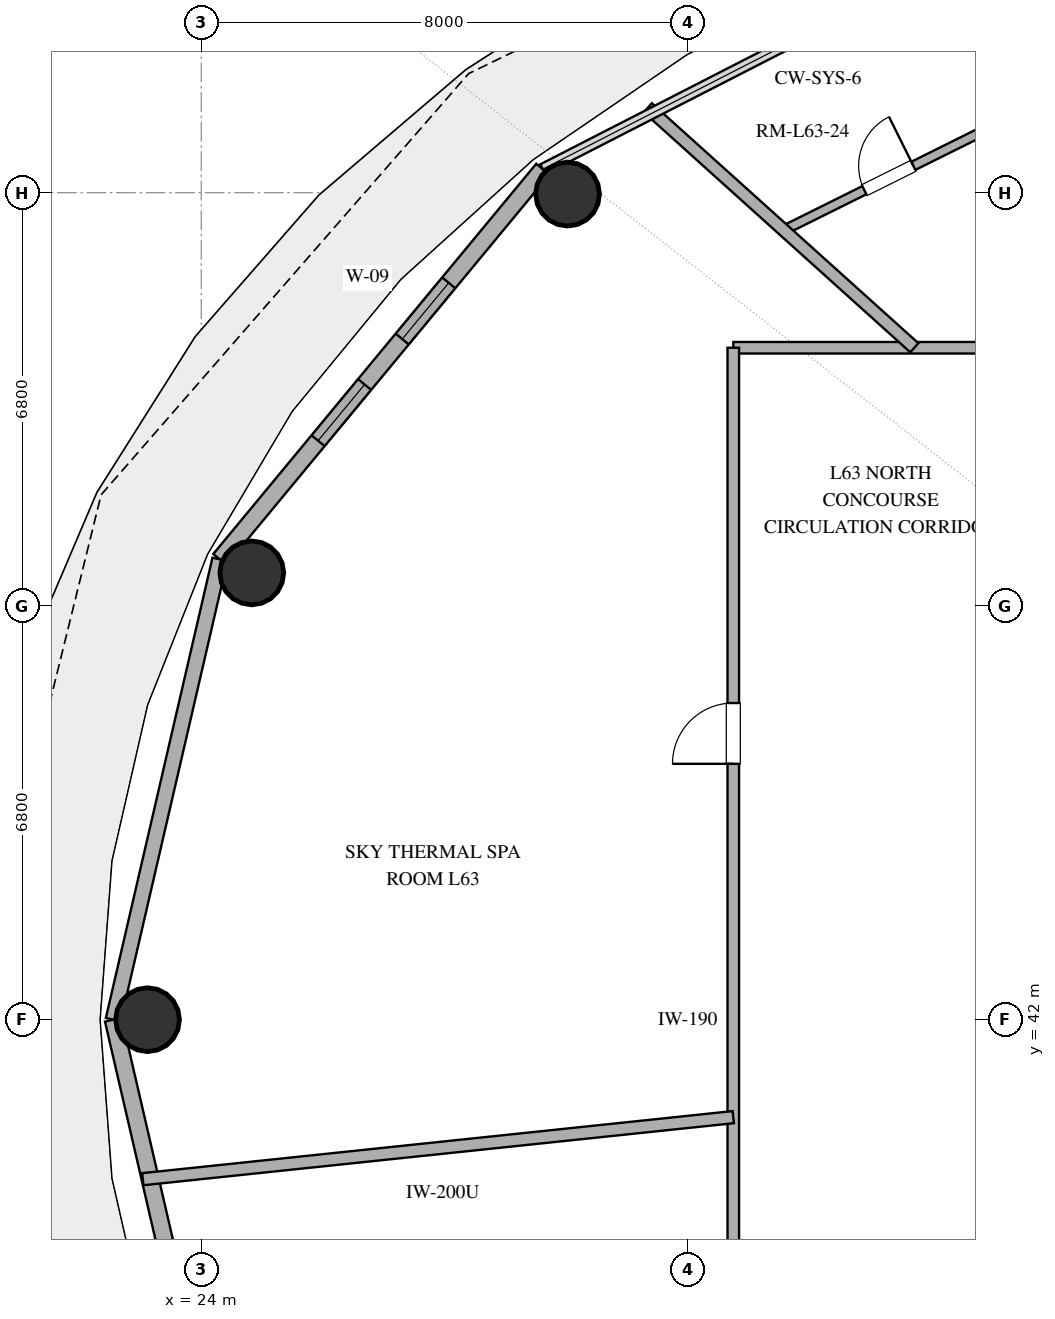
"""IFC4 building model, lengths in metres.
Left out: names, types, materials, properties, quantities, classifications, styles, units other than length and angle.
Written with IfcOpenShell. Run it as: python <this file> out.ifc"""

import sys

from ifc_helpers import new_model, si_unit, direction, frame, frame_2d, origin, origin_2d, place, context, subcontext, project, spatial, rectangle, hollow_circle, extrude, element, fill, save


model = new_model("IFC4")
c1 = context("Model", 3, precision=1e-05, world=origin(), true_north=direction((0.0, 1.0)))
c2 = subcontext(c1, "Body", "Model", "MODEL_VIEW")
j1 = project(units=[si_unit("LENGTHUNIT", "METRE"), si_unit("PLANEANGLEUNIT", "RADIAN")], contexts=[c1])
p1 = place(None, origin())
s1 = spatial("IfcSite", under=j1, at=p1, CompositionType="ELEMENT")
p2 = place(p1, origin())
s2 = spatial("IfcBuilding", under=s1, at=p2, CompositionType="ELEMENT")
p3 = place(p2, frame((0.0, 0.0, 246.0)))
s3 = spatial("IfcBuildingStorey", under=s2, at=p3, CompositionType="ELEMENT", Elevation=246.0)
for number, where, z_axis, x_axis in (
    (1, (30.025, 55.576, 0.0), (0.0, 0.0, 1.0), (1.0, 0.0, 0.0)),
    (2, (24.831, 49.347, 0.0), (0.0, 0.0, 1.0), (1.0, 0.0, 0.0)),
    (3, (23.117, 42.0, 0.0), (0.0, 0.0, 1.0), (1.0, 0.0, 0.0)),
):
    element("IfcColumn", number, at=place(p3, frame(where, z_axis=z_axis, x_axis=x_axis)), inside=s3, PredefinedType="COLUMN", context=c2, shape_type="SweptSolid", body=[
        extrude(hollow_circle(Radius=0.525, WallThickness=0.028, at=origin_2d()), origin(), (0.0, 0.0, 1.0), 3.36),
    ])
p4 = place(p3, frame((29.617, 55.987, 0.0), z_axis=(0.0, 0.0, 1.0), x_axis=(-0.63761509934, -0.770355103243, 0.0)))
e4 = element("IfcWall", 4, at=p4, inside=s3, PredefinedType="SOLIDWALL", context=c2, shape_type="SweptSolid", body=[
    extrude(rectangle(XDim=8.33, YDim=0.28, at=frame_2d((4.165, 0.0))), origin(), (0.0, 0.0, 1.0), 3.36),
])
p5 = place(p4, frame((2.426, 0.0, 0.85)))
e5 = element("IfcOpeningElement", 5, at=p5, cuts=e4, PredefinedType="OPENING", context=c2, shape_type="SweptSolid", body=[
    extrude(rectangle(XDim=1.2, YDim=1.8, at=frame_2d((0.6, 0.9))), frame((0.0, 0.15, 0.0), z_axis=(0.0, -1.0, 0.0), x_axis=(1.0, 0.0, 0.0)), (0.0, 0.0, 1.0), 0.3),
])
p6 = place(p4, frame((4.596, 0.0, 0.85)))
e6 = element("IfcOpeningElement", 6, at=p6, cuts=e4, PredefinedType="OPENING", context=c2, shape_type="SweptSolid", body=[
    extrude(rectangle(XDim=1.2, YDim=1.8, at=frame_2d((0.6, 0.9))), frame((0.0, 0.15, 0.0), z_axis=(0.0, -1.0, 0.0), x_axis=(1.0, 0.0, 0.0)), (0.0, 0.0, 1.0), 0.3),
])
p7 = place(p3, frame((24.306, 49.57, 0.0), z_axis=(0.0, 0.0, 1.0), x_axis=(-0.225635078214, -0.974211892495, 0.0)))
e7 = element("IfcWall", 7, at=p7, inside=s3, PredefinedType="SOLIDWALL", context=c2, shape_type="SweptSolid", body=[
    extrude(rectangle(XDim=7.77, YDim=0.25, at=frame_2d((3.885, 0.0))), origin(), (0.0, 0.0, 1.0), 3.36),
])
p8 = place(p3, frame((22.553, 42.0, 0.0), z_axis=(0.0, 0.0, 1.0), x_axis=(0.225635078214, -0.974211892495, 0.0)))
e8 = element("IfcWall", 8, at=p8, inside=s3, PredefinedType="SOLIDWALL", context=c2, shape_type="SweptSolid", body=[
    extrude(rectangle(XDim=7.77, YDim=0.28, at=frame_2d((3.885, 0.0))), origin(), (0.0, 0.0, 1.0), 3.36),
])
p9 = place(p8, frame((4.842, 0.0, 0.0)))
e9 = element("IfcOpeningElement", 9, at=p9, cuts=e8, PredefinedType="OPENING", context=c2, shape_type="SweptSolid", body=[
    extrude(rectangle(XDim=1.4, YDim=2.2, at=frame_2d((0.7, 1.1))), frame((0.0, 0.15, 0.0), z_axis=(0.0, -1.0, 0.0), x_axis=(1.0, 0.0, 0.0)), (0.0, 0.0, 1.0), 0.3),
])
p10 = place(p3, frame((32.75, 53.05, 0.0), z_axis=(0.0, 0.0, 1.0), x_axis=(1.0, 0.0, 0.0)))
e10 = element("IfcWall", 10, at=p10, inside=s3, PredefinedType="PARTITIONING", context=c2, shape_type="SweptSolid", body=[
    extrude(rectangle(XDim=19.527, YDim=0.19, at=frame_2d((9.763, 0.0))), origin(), (0.0, 0.0, 1.0), 2.72),
])
p11 = place(p10, frame((8.886, 0.0, 0.0)))
e11 = element("IfcOpeningElement", 11, at=p11, cuts=e10, PredefinedType="OPENING", context=c2, shape_type="SweptSolid", body=[
    extrude(rectangle(XDim=1.0, YDim=2.2, at=frame_2d((0.5, 1.1))), frame((0.0, 0.105, 0.0), z_axis=(0.0, -1.0, 0.0), x_axis=(1.0, 0.0, 0.0)), (0.0, 0.0, 1.0), 0.21),
])
p12 = place(p3, frame((32.75, 30.95, 0.0), z_axis=(0.0, 0.0, 1.0), x_axis=(0.0, 1.0, 0.0)))
e12 = element("IfcWall", 12, at=p12, inside=s3, PredefinedType="PARTITIONING", context=c2, shape_type="SweptSolid", body=[
    extrude(rectangle(XDim=22.1, YDim=0.19, at=frame_2d((11.05, 0.0))), origin(), (0.0, 0.0, 1.0), 2.72),
])
p13 = place(p12, frame((15.258, 0.0, 0.0)))
e13 = element("IfcOpeningElement", 13, at=p13, cuts=e12, PredefinedType="OPENING", context=c2, shape_type="SweptSolid", body=[
    extrude(rectangle(XDim=1.0, YDim=2.2, at=frame_2d((0.5, 1.1))), frame((0.0, 0.105, 0.0), z_axis=(0.0, -1.0, 0.0), x_axis=(1.0, 0.0, 0.0)), (0.0, 0.0, 1.0), 0.21),
])
p14 = place(p12, frame((4.24, 0.0, 0.0)))
e14 = element("IfcOpeningElement", 14, at=p14, cuts=e12, PredefinedType="OPENING", context=c2, shape_type="SweptSolid", body=[
    extrude(rectangle(XDim=1.0, YDim=2.2, at=frame_2d((0.5, 1.1))), frame((0.0, 0.105, 0.0), z_axis=(0.0, -1.0, 0.0), x_axis=(1.0, 0.0, 0.0)), (0.0, 0.0, 1.0), 0.21),
])
p15 = place(p3, frame((32.75, 40.397, 0.0), z_axis=(0.0, 0.0, 1.0), x_axis=(-0.994521469813, -0.104532512074, 0.0)))
e15 = element("IfcWall", 15, at=p15, inside=s3, PredefinedType="PARTITIONING", context=c2, shape_type="SweptSolid", body=[
    extrude(rectangle(XDim=9.765, YDim=0.2, at=frame_2d((4.882, 0.0))), origin(), (0.0, 0.0, 1.0), 2.72),
])
p16 = place(p3, frame((33.581, 54.983, 0.0), z_axis=(0.0, 0.0, 1.0), x_axis=(0.895475171501, 0.445111466069, 0.0)))
e16 = element("IfcWall", 16, at=p16, inside=s3, PredefinedType="PARTITIONING", context=c2, shape_type="SweptSolid", body=[
    extrude(rectangle(XDim=3.858, YDim=0.15, at=frame_2d((1.929, 0.0))), origin(), (0.0, 0.0, 1.0), 2.72),
])
p17 = place(p16, frame((1.479, 0.0, 0.0)))
e17 = element("IfcOpeningElement", 17, at=p17, cuts=e16, PredefinedType="OPENING", context=c2, shape_type="SweptSolid", body=[
    extrude(rectangle(XDim=0.9, YDim=2.1, at=frame_2d((0.45, 1.05))), frame((0.0, 0.085, 0.0), z_axis=(0.0, -1.0, 0.0), x_axis=(1.0, 0.0, 0.0)), (0.0, 0.0, 1.0), 0.17),
])
p18 = place(p3, frame((38.315, 56.806, 0.0), z_axis=(0.0, 0.0, 1.0), x_axis=(-0.547432597428, 0.8368497782, 0.0)))
e18 = element("IfcWall", 18, at=p18, inside=s3, PredefinedType="PARTITIONING", context=c2, shape_type="SweptSolid", body=[
    extrude(rectangle(XDim=3.374, YDim=0.15, at=frame_2d((1.687, 0.0))), origin(), (0.0, 0.0, 1.0), 2.72),
])
p19 = place(p3, frame((31.344, 56.997, 0.0), z_axis=(0.0, 0.0, 1.0), x_axis=(0.743158305959, -0.669115634464, 0.0)))
e19 = element("IfcWall", 19, at=p19, inside=s3, PredefinedType="PARTITIONING", context=c2, shape_type="SweptSolid", body=[
    extrude(rectangle(XDim=5.899, YDim=0.2, at=frame_2d((2.949, 0.0))), origin(), (0.0, 0.0, 1.0), 2.72),
])
p20 = place(p5, origin())
e20 = element("IfcWindow", 20, at=p20, inside=s3, PartitioningType="SINGLE_PANEL", PredefinedType="WINDOW", context=c2, shape_type="SweptSolid", body=[
    extrude(rectangle(XDim=1.2, YDim=1.8, at=frame_2d((0.6, 0.9))), frame((0.0, 0.03, 0.0), z_axis=(0.0, -1.0, 0.0), x_axis=(1.0, 0.0, 0.0)), (0.0, 0.0, 1.0), 0.06),
])
fill(e5, e20)
p21 = place(p6, origin())
e21 = element("IfcWindow", 21, at=p21, inside=s3, PartitioningType="SINGLE_PANEL", PredefinedType="WINDOW", context=c2, shape_type="SweptSolid", body=[
    extrude(rectangle(XDim=1.2, YDim=1.8, at=frame_2d((0.6, 0.9))), frame((0.0, 0.03, 0.0), z_axis=(0.0, -1.0, 0.0), x_axis=(1.0, 0.0, 0.0)), (0.0, 0.0, 1.0), 0.06),
])
fill(e6, e21)
p22 = place(p13, origin())
e22 = element("IfcDoor", 22, at=p22, inside=s3, OperationType="SINGLE_SWING_LEFT", PredefinedType="DOOR", context=c2, shape_type="SweptSolid", body=[
    extrude(rectangle(XDim=1.0, YDim=2.2, at=frame_2d((0.5, 1.1))), frame((0.0, 0.025, 0.0), z_axis=(0.0, -1.0, 0.0), x_axis=(1.0, 0.0, 0.0)), (0.0, 0.0, 1.0), 0.05),
])
fill(e13, e22)
p23 = place(p17, origin())
e23 = element("IfcDoor", 23, at=p23, inside=s3, OperationType="SINGLE_SWING_RIGHT", PredefinedType="DOOR", context=c2, shape_type="SweptSolid", body=[
    extrude(rectangle(XDim=0.9, YDim=2.1, at=frame_2d((0.45, 1.05))), frame((0.0, 0.025, 0.0), z_axis=(0.0, -1.0, 0.0), x_axis=(1.0, 0.0, 0.0)), (0.0, 0.0, 1.0), 0.05),
])
fill(e17, e23)
save(model, sys.argv[1])
